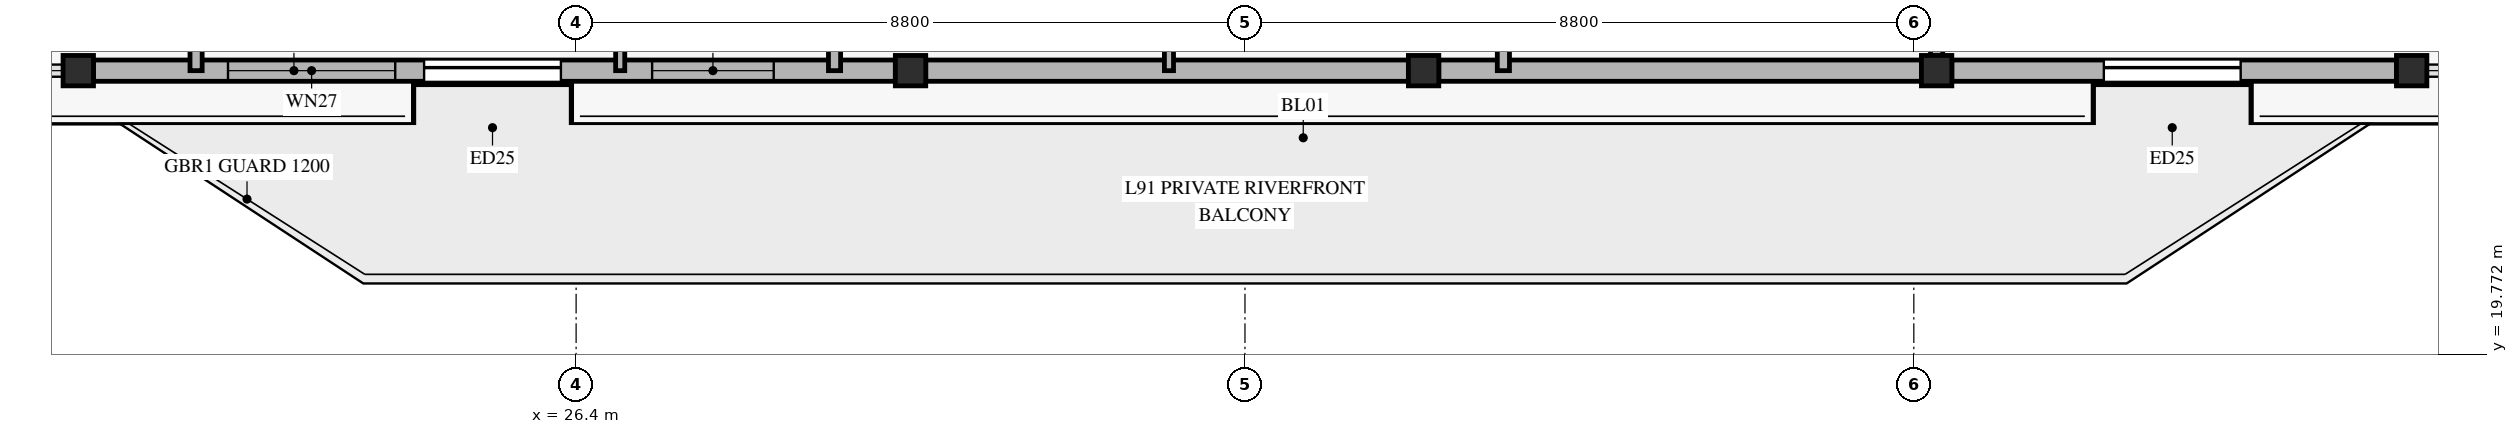
"""IFC4 building model, lengths in metres.
Left out: names, types, materials, properties, quantities, classifications, styles, units other than length and angle.
Written with IfcOpenShell. Run it as: python <this file> out.ifc"""

import sys

from ifc_helpers import new_model, si_unit, direction, frame, frame_2d, origin, origin_2d, place, context, subcontext, project, spatial, rectangle, hollow_rectangle, extrude, source, transform, mapped, element, fill, save


model = new_model("IFC4")
c1 = context("Model", 3, precision=1e-05, world=origin(), true_north=direction((0.0, 1.0)))
c2 = subcontext(c1, "Body", "Model", "MODEL_VIEW")
j1 = project(units=[si_unit("LENGTHUNIT", "METRE"), si_unit("PLANEANGLEUNIT", "RADIAN")], contexts=[c1])
p1 = place(None, origin())
s1 = spatial("IfcSite", under=j1, at=p1, CompositionType="ELEMENT")
p2 = place(p1, origin())
s2 = spatial("IfcBuilding", under=s1, at=p2, CompositionType="ELEMENT")
p3 = place(p2, frame((0.0, 0.0, 349.3)))
s3 = spatial("IfcBuildingStorey", under=s2, at=p3, CompositionType="ELEMENT", Elevation=349.3)
m1 = source(origin(), c2, "Body", "SweptSolid", [
    extrude(hollow_rectangle(XDim=0.4, YDim=0.4, WallThickness=0.02, at=origin_2d()), origin(), (0.0, 0.0, 1.0), 3.08),
])
for number, where, z_axis, x_axis in (
    (1, (19.85, 23.5, 0.0), (0.0, 0.0, 1.0), (1.0, 0.0, 0.0)),
    (2, (30.8, 23.5, 0.0), (0.0, 0.0, 1.0), (1.0, 0.0, 0.0)),
    (3, (37.55, 23.5, 0.0), (0.0, 0.0, 1.0), (1.0, 0.0, 0.0)),
    (4, (44.3, 23.5, 0.0), (0.0, 0.0, 1.0), (1.0, 0.0, 0.0)),
    (5, (50.55, 23.5, 0.0), (0.0, 0.0, 1.0), (1.0, 0.0, 0.0)),
):
    element("IfcColumn", number, at=place(p3, frame(where, z_axis=z_axis, x_axis=x_axis)), inside=s3, PredefinedType="COLUMN", context=c2, shape_type="MappedRepresentation", body=[
        mapped(m1, transform((0.0, 0.0, 0.0), x_axis=(1.0, 0.0, 0.0), y_axis=(0.0, 1.0, 0.0), z_axis=(0.0, 0.0, 1.0), scale=1.0)),
    ])
p4 = place(p3, frame((20.05, 23.5, 0.0), z_axis=(0.0, 0.0, 1.0), x_axis=(1.0, 0.0, 0.0)))
e6 = element("IfcWall", 6, at=p4, inside=s3, PredefinedType="SOLIDWALL", context=c2, shape_type="SweptSolid", body=[
    extrude(rectangle(XDim=10.55, YDim=0.28, at=frame_2d((5.275, 0.0))), origin(), (0.0, 0.0, 1.0), 2.71),
])
p5 = place(p4, frame((4.35, 0.0, 0.0)))
e7 = element("IfcOpeningElement", 7, at=p5, cuts=e6, PredefinedType="OPENING", context=c2, shape_type="SweptSolid", body=[
    extrude(rectangle(XDim=1.8, YDim=2.25, at=frame_2d((0.9, 1.125))), frame((0.0, 0.15, 0.0), z_axis=(0.0, -1.0, 0.0), x_axis=(1.0, 0.0, 0.0)), (0.0, 0.0, 1.0), 0.3),
])
p6 = place(p4, frame((1.77, 0.0, 0.35)))
e8 = element("IfcOpeningElement", 8, at=p6, cuts=e6, PredefinedType="OPENING", context=c2, shape_type="SweptSolid", body=[
    extrude(rectangle(XDim=2.2, YDim=2.1, at=frame_2d((1.1, 1.05))), frame((0.0, 0.15, 0.0), z_axis=(0.0, -1.0, 0.0), x_axis=(1.0, 0.0, 0.0)), (0.0, 0.0, 1.0), 0.3),
])
p7 = place(p4, frame((7.35, 0.0, 0.35)))
e9 = element("IfcOpeningElement", 9, at=p7, cuts=e6, PredefinedType="OPENING", context=c2, shape_type="SweptSolid", body=[
    extrude(rectangle(XDim=1.6, YDim=2.0, at=frame_2d((0.8, 1.0))), frame((0.0, 0.15, 0.0), z_axis=(0.0, -1.0, 0.0), x_axis=(1.0, 0.0, 0.0)), (0.0, 0.0, 1.0), 0.3),
])
for number, where, z_axis, x_axis in (
    (10, (31.0, 23.5, 0.0), (0.0, 0.0, 1.0), (1.0, 0.0, 0.0)),
    (11, (37.75, 23.5, 0.0), (0.0, 0.0, 1.0), (1.0, 0.0, 0.0)),
):
    element("IfcWall", number, at=place(p3, frame(where, z_axis=z_axis, x_axis=x_axis)), inside=s3, PredefinedType="SOLIDWALL", context=c2, shape_type="SweptSolid", body=[
        extrude(rectangle(XDim=6.35, YDim=0.28, at=frame_2d((3.175, 0.0))), origin(), (0.0, 0.0, 1.0), 2.71),
    ])
p8 = place(p3, frame((44.5, 23.5, 0.0), z_axis=(0.0, 0.0, 1.0), x_axis=(1.0, 0.0, 0.0)))
e12 = element("IfcWall", 12, at=p8, inside=s3, PredefinedType="SOLIDWALL", context=c2, shape_type="SweptSolid", body=[
    extrude(rectangle(XDim=5.85, YDim=0.28, at=frame_2d((2.925, 0.0))), origin(), (0.0, 0.0, 1.0), 2.71),
])
p9 = place(p8, frame((2.0, 0.0, 0.0)))
e13 = element("IfcOpeningElement", 13, at=p9, cuts=e12, PredefinedType="OPENING", context=c2, shape_type="SweptSolid", body=[
    extrude(rectangle(XDim=1.8, YDim=2.25, at=frame_2d((0.9, 1.125))), frame((0.0, 0.15, 0.0), z_axis=(0.0, -1.0, 0.0), x_axis=(1.0, 0.0, 0.0)), (0.0, 0.0, 1.0), 0.3),
])
p10 = place(p3, frame((21.4, 23.5, 0.0), z_axis=(0.0, 0.0, 1.0), x_axis=(0.0, 1.0, 0.0)))
e14 = element("IfcWall", 14, at=p10, inside=s3, PredefinedType="PARTITIONING", context=c2, shape_type="SweptSolid", body=[
    extrude(rectangle(XDim=13.95, YDim=0.16, at=frame_2d((6.975, 0.0))), origin(), (0.0, 0.0, 1.0), 2.665),
])
p11 = place(p10, frame((11.82, 0.0, 0.0)))
e15 = element("IfcOpeningElement", 15, at=p11, cuts=e14, PredefinedType="OPENING", context=c2, shape_type="SweptSolid", body=[
    extrude(rectangle(XDim=1.05, YDim=2.15, at=frame_2d((0.525, 1.075))), frame((0.0, 0.09, 0.0), z_axis=(0.0, -1.0, 0.0), x_axis=(1.0, 0.0, 0.0)), (0.0, 0.0, 1.0), 0.18),
])
for number, where, z_axis, x_axis in (
    (16, (29.8, 23.5, 0.0), (0.0, 0.0, 1.0), (0.0, 1.0, 0.0)),
    (17, (38.6, 23.5, 0.0), (0.0, 0.0, 1.0), (0.0, 1.0, 0.0)),
):
    element("IfcWall", number, at=place(p3, frame(where, z_axis=z_axis, x_axis=x_axis)), inside=s3, PredefinedType="PARTITIONING", context=c2, shape_type="SweptSolid", body=[
        extrude(rectangle(XDim=11.4, YDim=0.16, at=frame_2d((5.7, 0.0))), origin(), (0.0, 0.0, 1.0), 2.665),
    ])
p12 = place(p3, frame((44.3, 23.5, 0.0), z_axis=(0.0, 0.0, 1.0), x_axis=(0.0, 1.0, 0.0)))
e18 = element("IfcWall", 18, at=p12, inside=s3, PredefinedType="PARTITIONING", context=c2, shape_type="SweptSolid", body=[
    extrude(rectangle(XDim=13.95, YDim=0.16, at=frame_2d((6.975, 0.0))), origin(), (0.0, 0.0, 1.0), 2.365),
])
p13 = place(p12, frame((11.82, 0.0, 0.0)))
e19 = element("IfcOpeningElement", 19, at=p13, cuts=e18, PredefinedType="OPENING", context=c2, shape_type="SweptSolid", body=[
    extrude(rectangle(XDim=1.05, YDim=2.15, at=frame_2d((0.525, 1.075))), frame((0.0, 0.09, 0.0), z_axis=(0.0, -1.0, 0.0), x_axis=(1.0, 0.0, 0.0)), (0.0, 0.0, 1.0), 0.18),
])
p14 = place(p3, frame((26.98, 23.5, 0.0), z_axis=(0.0, 0.0, 1.0), x_axis=(0.0, 1.0, 0.0)))
e20 = element("IfcWall", 20, at=p14, inside=s3, PredefinedType="PARTITIONING", context=c2, shape_type="SweptSolid", body=[
    extrude(rectangle(XDim=8.75, YDim=0.12, at=frame_2d((4.375, 0.0))), origin(), (0.0, 0.0, 1.0), 2.665),
])
p15 = place(p14, frame((0.8, 0.0, 0.0)))
e21 = element("IfcOpeningElement", 21, at=p15, cuts=e20, PredefinedType="OPENING", context=c2, shape_type="SweptSolid", body=[
    extrude(rectangle(XDim=0.95, YDim=2.1, at=frame_2d((0.475, 1.05))), frame((0.0, 0.07, 0.0), z_axis=(0.0, -1.0, 0.0), x_axis=(1.0, 0.0, 0.0)), (0.0, 0.0, 1.0), 0.14),
])
p16 = place(p3, frame((34.2, 23.5, 0.0), z_axis=(0.0, 0.0, 1.0), x_axis=(0.0, 1.0, 0.0)))
e22 = element("IfcWall", 22, at=p16, inside=s3, PredefinedType="PARTITIONING", context=c2, shape_type="SweptSolid", body=[
    extrude(rectangle(XDim=8.75, YDim=0.12, at=frame_2d((4.375, 0.0))), origin(), (0.0, 0.0, 1.0), 2.665),
])
p17 = place(p16, frame((1.72, 0.0, 0.0)))
e23 = element("IfcOpeningElement", 23, at=p17, cuts=e22, PredefinedType="OPENING", context=c2, shape_type="SweptSolid", body=[
    extrude(rectangle(XDim=0.95, YDim=2.1, at=frame_2d((0.475, 1.05))), frame((0.0, 0.07, 0.0), z_axis=(0.0, -1.0, 0.0), x_axis=(1.0, 0.0, 0.0)), (0.0, 0.0, 1.0), 0.14),
])
m2 = source(origin(), c2, "Body", "SweptSolid", [
    extrude(rectangle(XDim=1.8, YDim=2.25, at=frame_2d((0.9, 1.125))), frame((0.0, 0.025, 0.0), z_axis=(0.0, -1.0, 0.0), x_axis=(1.0, 0.0, 0.0)), (0.0, 0.0, 1.0), 0.05),
])
p18 = place(p5, origin())
e24 = element("IfcDoor", 24, at=p18, inside=s3, OperationType="SLIDING_TO_LEFT", PredefinedType="DOOR", context=c2, shape_type="MappedRepresentation", body=[
    mapped(m2, transform((0.0, 0.0, 0.0), x_axis=(1.0, 0.0, 0.0), y_axis=(0.0, 1.0, 0.0), z_axis=(0.0, 0.0, 1.0), scale=1.0)),
])
fill(e7, e24)
m3 = source(origin(), c2, "Body", "SweptSolid", [
    extrude(rectangle(XDim=2.2, YDim=2.1, at=frame_2d((1.1, 1.05))), frame((0.0, 0.03, 0.0), z_axis=(0.0, -1.0, 0.0), x_axis=(1.0, 0.0, 0.0)), (0.0, 0.0, 1.0), 0.06),
])
p19 = place(p6, origin())
e25 = element("IfcWindow", 25, at=p19, inside=s3, PartitioningType="SINGLE_PANEL", PredefinedType="WINDOW", context=c2, shape_type="MappedRepresentation", body=[
    mapped(m3, transform((0.0, 0.0, 0.0), x_axis=(1.0, 0.0, 0.0), y_axis=(0.0, 1.0, 0.0), z_axis=(0.0, 0.0, 1.0), scale=1.0)),
])
fill(e8, e25)
m4 = source(origin(), c2, "Body", "SweptSolid", [
    extrude(rectangle(XDim=1.6, YDim=2.0, at=frame_2d((0.8, 1.0))), frame((0.0, 0.03, 0.0), z_axis=(0.0, -1.0, 0.0), x_axis=(1.0, 0.0, 0.0)), (0.0, 0.0, 1.0), 0.06),
])
p20 = place(p7, origin())
e26 = element("IfcWindow", 26, at=p20, inside=s3, PartitioningType="SINGLE_PANEL", PredefinedType="WINDOW", context=c2, shape_type="MappedRepresentation", body=[
    mapped(m4, transform((0.0, 0.0, 0.0), x_axis=(1.0, 0.0, 0.0), y_axis=(0.0, 1.0, 0.0), z_axis=(0.0, 0.0, 1.0), scale=1.0)),
])
fill(e9, e26)
p21 = place(p9, origin())
e27 = element("IfcDoor", 27, at=p21, inside=s3, OperationType="SLIDING_TO_LEFT", PredefinedType="DOOR", context=c2, shape_type="MappedRepresentation", body=[
    mapped(m2, transform((0.0, 0.0, 0.0), x_axis=(1.0, 0.0, 0.0), y_axis=(0.0, 1.0, 0.0), z_axis=(0.0, 0.0, 1.0), scale=1.0)),
])
fill(e13, e27)
save(model, sys.argv[1])
